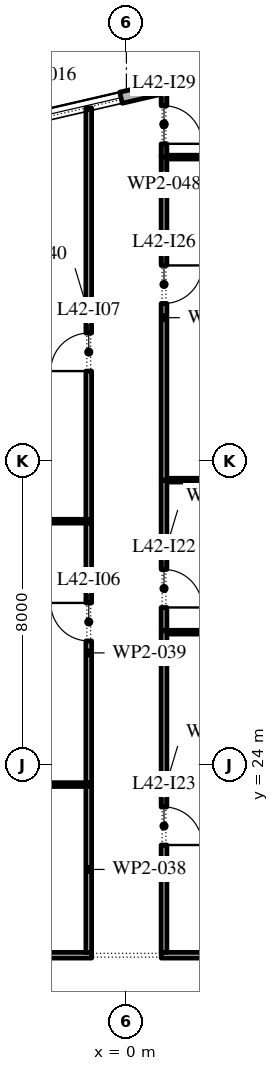
"""IFC4 building model, lengths in metres.
Left out: names, types, materials, properties, quantities, classifications, styles, units other than length and angle.
Written with IfcOpenShell. Run it as: python <this file> out.ifc"""

import sys

from ifc_helpers import new_model, si_unit, direction, frame, frame_2d, origin, place, context, subcontext, project, spatial, rectangle, extrude, element, fill, save


model = new_model("IFC4")
c1 = context("Model", 3, precision=1e-05, world=origin(), true_north=direction((0.0, 1.0)))
c2 = subcontext(c1, "Body", "Model", "MODEL_VIEW")
j1 = project(units=[si_unit("LENGTHUNIT", "METRE"), si_unit("PLANEANGLEUNIT", "RADIAN")], contexts=[c1])
p1 = place(None, origin())
s1 = spatial("IfcSite", under=j1, at=p1, CompositionType="ELEMENT")
p2 = place(p1, origin())
s2 = spatial("IfcBuilding", under=s1, at=p2, CompositionType="ELEMENT")
p3 = place(p2, frame((0.0, 0.0, 192.6)))
s3 = spatial("IfcBuildingStorey", under=s2, at=p3, CompositionType="ELEMENT", Elevation=192.6)
p4 = place(p3, frame((17.592, 45.657, 0.0), z_axis=(0.0, 0.0, 1.0), x_axis=(-0.974370243697, -0.224950279389, 0.0)))
e1 = element("IfcWall", 1, at=p4, inside=s3, PredefinedType="STANDARD", context=c2, shape_type="SweptSolid", body=[
    extrude(rectangle(XDim=49.5, YDim=0.3, at=frame_2d((24.75, 0.0))), origin(), (0.0, 0.0, 1.0), 4.0),
])
p5 = place(p4, frame((2.8, 0.0, 0.0)))
e2 = element("IfcOpeningElement", 2, at=p5, cuts=e1, PredefinedType="OPENING", context=c2, shape_type="SweptSolid", body=[
    extrude(rectangle(XDim=2.4, YDim=3.5, at=frame_2d((1.2, 1.75))), frame((0.0, 0.16, 0.0), z_axis=(0.0, -1.0, 0.0), x_axis=(1.0, 0.0, 0.0)), (0.0, 0.0, 1.0), 0.32),
])
p6 = place(p4, frame((9.9, 0.0, 0.45)))
e3 = element("IfcOpeningElement", 3, at=p6, cuts=e1, PredefinedType="OPENING", context=c2, shape_type="SweptSolid", body=[
    extrude(rectangle(XDim=4.5, YDim=2.45, at=frame_2d((2.25, 1.225))), frame((0.0, 0.16, 0.0), z_axis=(0.0, -1.0, 0.0), x_axis=(1.0, 0.0, 0.0)), (0.0, 0.0, 1.0), 0.32),
])
p7 = place(p4, frame((18.2, 0.0, 0.45)))
e4 = element("IfcOpeningElement", 4, at=p7, cuts=e1, PredefinedType="OPENING", context=c2, shape_type="SweptSolid", body=[
    extrude(rectangle(XDim=4.5, YDim=2.45, at=frame_2d((2.25, 1.225))), frame((0.0, 0.16, 0.0), z_axis=(0.0, -1.0, 0.0), x_axis=(1.0, 0.0, 0.0)), (0.0, 0.0, 1.0), 0.32),
])
p8 = place(p4, frame((26.5, 0.0, 0.45)))
e5 = element("IfcOpeningElement", 5, at=p8, cuts=e1, PredefinedType="OPENING", context=c2, shape_type="SweptSolid", body=[
    extrude(rectangle(XDim=4.5, YDim=2.525, at=frame_2d((2.25, 1.262))), frame((0.0, 0.16, 0.0), z_axis=(0.0, -1.0, 0.0), x_axis=(1.0, 0.0, 0.0)), (0.0, 0.0, 1.0), 0.32),
])
p9 = place(p4, frame((35.85, 0.0, 0.0)))
e6 = element("IfcOpeningElement", 6, at=p9, cuts=e1, PredefinedType="OPENING", context=c2, shape_type="SweptSolid", body=[
    extrude(rectangle(XDim=2.4, YDim=3.5, at=frame_2d((1.2, 1.75))), frame((0.0, 0.16, 0.0), z_axis=(0.0, -1.0, 0.0), x_axis=(1.0, 0.0, 0.0)), (0.0, 0.0, 1.0), 0.32),
])
p10 = place(p4, frame((43.1, 0.0, 0.45)))
e7 = element("IfcOpeningElement", 7, at=p10, cuts=e1, PredefinedType="OPENING", context=c2, shape_type="SweptSolid", body=[
    extrude(rectangle(XDim=4.5, YDim=2.675, at=frame_2d((2.25, 1.337))), frame((0.0, 0.16, 0.0), z_axis=(0.0, -1.0, 0.0), x_axis=(1.0, 0.0, 0.0)), (0.0, 0.0, 1.0), 0.32),
])
p11 = place(p3, frame((-8.275, 19.0, 0.0), z_axis=(0.0, 0.0, 1.0), x_axis=(1.0, 0.0, 0.0)))
e8 = element("IfcWall", 8, at=p11, inside=s3, PredefinedType="PARTITIONING", context=c2, shape_type="SweptSolid", body=[
    extrude(rectangle(XDim=7.36, YDim=0.15, at=frame_2d((3.68, 0.0))), origin(), (0.0, 0.0, 1.0), 4.0),
])
p12 = place(p11, frame((4.635, 0.0, 0.0)))
e9 = element("IfcOpeningElement", 9, at=p12, cuts=e8, PredefinedType="OPENING", context=c2, shape_type="SweptSolid", body=[
    extrude(rectangle(XDim=1.0, YDim=2.1, at=frame_2d((0.5, 1.05))), frame((0.0, 0.085, 0.0), z_axis=(0.0, -1.0, 0.0), x_axis=(1.0, 0.0, 0.0)), (0.0, 0.0, 1.0), 0.17),
])
p13 = place(p3, frame((-6.425, 23.49, 0.0), z_axis=(0.0, 0.0, 1.0), x_axis=(1.0, 0.0, 0.0)))
e10 = element("IfcWall", 10, at=p13, inside=s3, PredefinedType="PARTITIONING", context=c2, shape_type="SweptSolid", body=[
    extrude(rectangle(XDim=5.51, YDim=0.1, at=frame_2d((2.755, 0.0))), origin(), (0.0, 0.0, 1.0), 4.0),
])
p14 = place(p3, frame((-6.5, 30.42, 0.0), z_axis=(0.0, 0.0, 1.0), x_axis=(1.0, 0.0, 0.0)))
e11 = element("IfcWall", 11, at=p14, inside=s3, PredefinedType="PARTITIONING", context=c2, shape_type="SweptSolid", body=[
    extrude(rectangle(XDim=5.585, YDim=0.1, at=frame_2d((2.792, 0.0))), origin(), (0.0, 0.0, 1.0), 4.0),
])
p15 = place(p3, frame((-0.99, 19.075, 0.0), z_axis=(0.0, 0.0, 1.0), x_axis=(0.0, 1.0, 0.0)))
e12 = element("IfcWall", 12, at=p15, inside=s3, PredefinedType="PARTITIONING", context=c2, shape_type="SweptSolid", body=[
    extrude(rectangle(XDim=4.365, YDim=0.15, at=frame_2d((2.183, 0.0))), origin(), (0.0, 0.0, 1.0), 4.0),
])
p16 = place(p3, frame((-0.99, 23.54, 0.0), z_axis=(0.0, 0.0, 1.0), x_axis=(0.0, 1.0, 0.0)))
e13 = element("IfcWall", 13, at=p16, inside=s3, PredefinedType="PARTITIONING", context=c2, shape_type="SweptSolid", body=[
    extrude(rectangle(XDim=6.83, YDim=0.15, at=frame_2d((3.415, 0.0))), origin(), (0.0, 0.0, 1.0), 4.0),
])
p17 = place(p16, frame((3.73, 0.0, 0.0)))
e14 = element("IfcOpeningElement", 14, at=p17, cuts=e13, PredefinedType="OPENING", context=c2, shape_type="SweptSolid", body=[
    extrude(rectangle(XDim=1.0, YDim=2.1, at=frame_2d((0.5, 1.05))), frame((0.0, 0.085, 0.0), z_axis=(0.0, -1.0, 0.0), x_axis=(1.0, 0.0, 0.0)), (0.0, 0.0, 1.0), 0.17),
])
p18 = place(p3, frame((-0.99, 30.47, 0.0), z_axis=(0.0, 0.0, 1.0), x_axis=(0.0, 1.0, 0.0)))
e15 = element("IfcWall", 15, at=p18, inside=s3, PredefinedType="PARTITIONING", context=c2, shape_type="SweptSolid", body=[
    extrude(rectangle(XDim=10.826, YDim=0.15, at=frame_2d((5.413, 0.0))), origin(), (0.0, 0.0, 1.0), 4.0),
])
p19 = place(p18, frame((3.9, 0.0, 0.0)))
e16 = element("IfcOpeningElement", 16, at=p19, cuts=e15, PredefinedType="OPENING", context=c2, shape_type="SweptSolid", body=[
    extrude(rectangle(XDim=1.0, YDim=2.1, at=frame_2d((0.5, 1.05))), frame((0.0, 0.085, 0.0), z_axis=(0.0, -1.0, 0.0), x_axis=(1.0, 0.0, 0.0)), (0.0, 0.0, 1.0), 0.17),
])
p20 = place(p3, frame((0.915, 19.0, 0.0), z_axis=(0.0, 0.0, 1.0), x_axis=(1.0, 0.0, 0.0)))
e17 = element("IfcWall", 17, at=p20, inside=s3, PredefinedType="PARTITIONING", context=c2, shape_type="SweptSolid", body=[
    extrude(rectangle(XDim=7.35, YDim=0.15, at=frame_2d((3.675, 0.0))), origin(), (0.0, 0.0, 1.0), 4.0),
])
p21 = place(p3, frame((0.99, 27.55, 0.0), z_axis=(0.0, 0.0, 1.0), x_axis=(0.0, -1.0, 0.0)))
e18 = element("IfcWall", 18, at=p21, inside=s3, PredefinedType="PARTITIONING", context=c2, shape_type="SweptSolid", body=[
    extrude(rectangle(XDim=8.475, YDim=0.15, at=frame_2d((4.238, 0.0))), origin(), (0.0, 0.0, 1.0), 4.0),
])
p22 = place(p21, frame((4.65, 0.0, 0.0)))
e19 = element("IfcOpeningElement", 19, at=p22, cuts=e18, PredefinedType="OPENING", context=c2, shape_type="SweptSolid", body=[
    extrude(rectangle(XDim=1.0, YDim=2.1, at=frame_2d((0.5, 1.05))), frame((0.0, 0.085, 0.0), z_axis=(0.0, -1.0, 0.0), x_axis=(1.0, 0.0, 0.0)), (0.0, 0.0, 1.0), 0.17),
])
p23 = place(p3, frame((0.99, 31.5, 0.0), z_axis=(0.0, 0.0, 1.0), x_axis=(0.0, -1.0, 0.0)))
e20 = element("IfcWall", 20, at=p23, inside=s3, PredefinedType="PARTITIONING", context=c2, shape_type="SweptSolid", body=[
    extrude(rectangle(XDim=3.95, YDim=0.15, at=frame_2d((1.975, 0.0))), origin(), (0.0, 0.0, 1.0), 4.0),
])
p24 = place(p23, frame((2.35, 0.0, 0.0)))
e21 = element("IfcOpeningElement", 21, at=p24, cuts=e20, PredefinedType="OPENING", context=c2, shape_type="SweptSolid", body=[
    extrude(rectangle(XDim=1.0, YDim=2.1, at=frame_2d((0.5, 1.05))), frame((0.0, 0.085, 0.0), z_axis=(0.0, -1.0, 0.0), x_axis=(1.0, 0.0, 0.0)), (0.0, 0.0, 1.0), 0.17),
])
p25 = place(p3, frame((1.065, 31.5, 0.0), z_axis=(0.0, 0.0, 1.0), x_axis=(1.0, 0.0, 0.0)))
e22 = element("IfcWall", 22, at=p25, inside=s3, PredefinedType="PARTITIONING", context=c2, shape_type="SweptSolid", body=[
    extrude(rectangle(XDim=6.485, YDim=0.1, at=frame_2d((3.243, 0.0))), origin(), (0.0, 0.0, 1.0), 4.0),
])
p26 = place(p3, frame((0.99, 40.05, 0.0), z_axis=(0.0, 0.0, 1.0), x_axis=(0.0, -1.0, 0.0)))
e23 = element("IfcWall", 23, at=p26, inside=s3, PredefinedType="PARTITIONING", context=c2, shape_type="SweptSolid", body=[
    extrude(rectangle(XDim=8.55, YDim=0.15, at=frame_2d((4.275, 0.0))), origin(), (0.0, 0.0, 1.0), 4.0),
])
p27 = place(p26, frame((2.9, 0.0, 0.0)))
e24 = element("IfcOpeningElement", 24, at=p27, cuts=e23, PredefinedType="OPENING", context=c2, shape_type="SweptSolid", body=[
    extrude(rectangle(XDim=1.0, YDim=2.1, at=frame_2d((0.5, 1.05))), frame((0.0, 0.085, 0.0), z_axis=(0.0, -1.0, 0.0), x_axis=(1.0, 0.0, 0.0)), (0.0, 0.0, 1.0), 0.17),
])
p28 = place(p3, frame((1.065, 40.0, 0.0), z_axis=(0.0, 0.0, 1.0), x_axis=(1.0, 0.0, 0.0)))
e25 = element("IfcWall", 25, at=p28, inside=s3, PredefinedType="PARTITIONING", context=c2, shape_type="SweptSolid", body=[
    extrude(rectangle(XDim=8.815, YDim=0.1, at=frame_2d((4.407, 0.0))), origin(), (0.0, 0.0, 1.0), 4.0),
])
p29 = place(p3, frame((0.99, 41.753, 0.0), z_axis=(0.0, 0.0, 1.0), x_axis=(0.0, -1.0, 0.0)))
e26 = element("IfcWall", 26, at=p29, inside=s3, PredefinedType="PARTITIONING", context=c2, shape_type="SweptSolid", body=[
    extrude(rectangle(XDim=1.753, YDim=0.15, at=frame_2d((0.876, 0.0))), origin(), (0.0, 0.0, 1.0), 4.0),
])
p30 = place(p29, frame((0.403, 0.0, 0.0)))
e27 = element("IfcOpeningElement", 27, at=p30, cuts=e26, PredefinedType="OPENING", context=c2, shape_type="SweptSolid", body=[
    extrude(rectangle(XDim=1.0, YDim=2.1, at=frame_2d((0.5, 1.05))), frame((0.0, 0.085, 0.0), z_axis=(0.0, -1.0, 0.0), x_axis=(1.0, 0.0, 0.0)), (0.0, 0.0, 1.0), 0.17),
])
p31 = place(p3, frame((7.55, 27.5, 0.0), z_axis=(0.0, 0.0, 1.0), x_axis=(-1.0, 0.0, 0.0)))
e28 = element("IfcWall", 28, at=p31, inside=s3, PredefinedType="PARTITIONING", context=c2, shape_type="SweptSolid", body=[
    extrude(rectangle(XDim=6.485, YDim=0.1, at=frame_2d((3.243, 0.0))), origin(), (0.0, 0.0, 1.0), 4.0),
])
p32 = place(p7, origin())
e29 = element("IfcWindow", 29, at=p32, inside=s3, PartitioningType="DOUBLE_PANEL_VERTICAL", PredefinedType="WINDOW", context=c2, shape_type="SweptSolid", body=[
    extrude(rectangle(XDim=4.5, YDim=2.45, at=frame_2d((2.25, 1.225))), frame((0.0, 0.03, 0.0), z_axis=(0.0, -1.0, 0.0), x_axis=(1.0, 0.0, 0.0)), (0.0, 0.0, 1.0), 0.06),
])
fill(e4, e29)
p33 = place(p17, origin())
e30 = element("IfcDoor", 30, at=p33, inside=s3, OperationType="SINGLE_SWING_LEFT", PredefinedType="DOOR", context=c2, shape_type="SweptSolid", body=[
    extrude(rectangle(XDim=1.0, YDim=2.1, at=frame_2d((0.5, 1.05))), frame((0.0, 0.025, 0.0), z_axis=(0.0, -1.0, 0.0), x_axis=(1.0, 0.0, 0.0)), (0.0, 0.0, 1.0), 0.05),
])
fill(e14, e30)
p34 = place(p19, origin())
e31 = element("IfcDoor", 31, at=p34, inside=s3, OperationType="SINGLE_SWING_RIGHT", PredefinedType="DOOR", context=c2, shape_type="SweptSolid", body=[
    extrude(rectangle(XDim=1.0, YDim=2.1, at=frame_2d((0.5, 1.05))), frame((0.0, 0.025, 0.0), z_axis=(0.0, -1.0, 0.0), x_axis=(1.0, 0.0, 0.0)), (0.0, 0.0, 1.0), 0.05),
])
fill(e16, e31)
p35 = place(p24, origin())
e32 = element("IfcDoor", 32, at=p35, inside=s3, OperationType="SINGLE_SWING_LEFT", PredefinedType="DOOR", context=c2, shape_type="SweptSolid", body=[
    extrude(rectangle(XDim=1.0, YDim=2.1, at=frame_2d((0.5, 1.05))), frame((0.0, 0.025, 0.0), z_axis=(0.0, -1.0, 0.0), x_axis=(1.0, 0.0, 0.0)), (0.0, 0.0, 1.0), 0.05),
])
fill(e21, e32)
p36 = place(p22, origin())
e33 = element("IfcDoor", 33, at=p36, inside=s3, OperationType="SINGLE_SWING_LEFT", PredefinedType="DOOR", context=c2, shape_type="SweptSolid", body=[
    extrude(rectangle(XDim=1.0, YDim=2.1, at=frame_2d((0.5, 1.05))), frame((0.0, 0.025, 0.0), z_axis=(0.0, -1.0, 0.0), x_axis=(1.0, 0.0, 0.0)), (0.0, 0.0, 1.0), 0.05),
])
fill(e19, e33)
p37 = place(p27, origin())
e34 = element("IfcDoor", 34, at=p37, inside=s3, OperationType="SINGLE_SWING_RIGHT", PredefinedType="DOOR", context=c2, shape_type="SweptSolid", body=[
    extrude(rectangle(XDim=1.0, YDim=2.1, at=frame_2d((0.5, 1.05))), frame((0.0, 0.025, 0.0), z_axis=(0.0, -1.0, 0.0), x_axis=(1.0, 0.0, 0.0)), (0.0, 0.0, 1.0), 0.05),
])
fill(e24, e34)
p38 = place(p30, origin())
e35 = element("IfcDoor", 35, at=p38, inside=s3, OperationType="SINGLE_SWING_LEFT", PredefinedType="DOOR", context=c2, shape_type="SweptSolid", body=[
    extrude(rectangle(XDim=1.0, YDim=2.1, at=frame_2d((0.5, 1.05))), frame((0.0, 0.025, 0.0), z_axis=(0.0, -1.0, 0.0), x_axis=(1.0, 0.0, 0.0)), (0.0, 0.0, 1.0), 0.05),
])
fill(e27, e35)
save(model, sys.argv[1])
